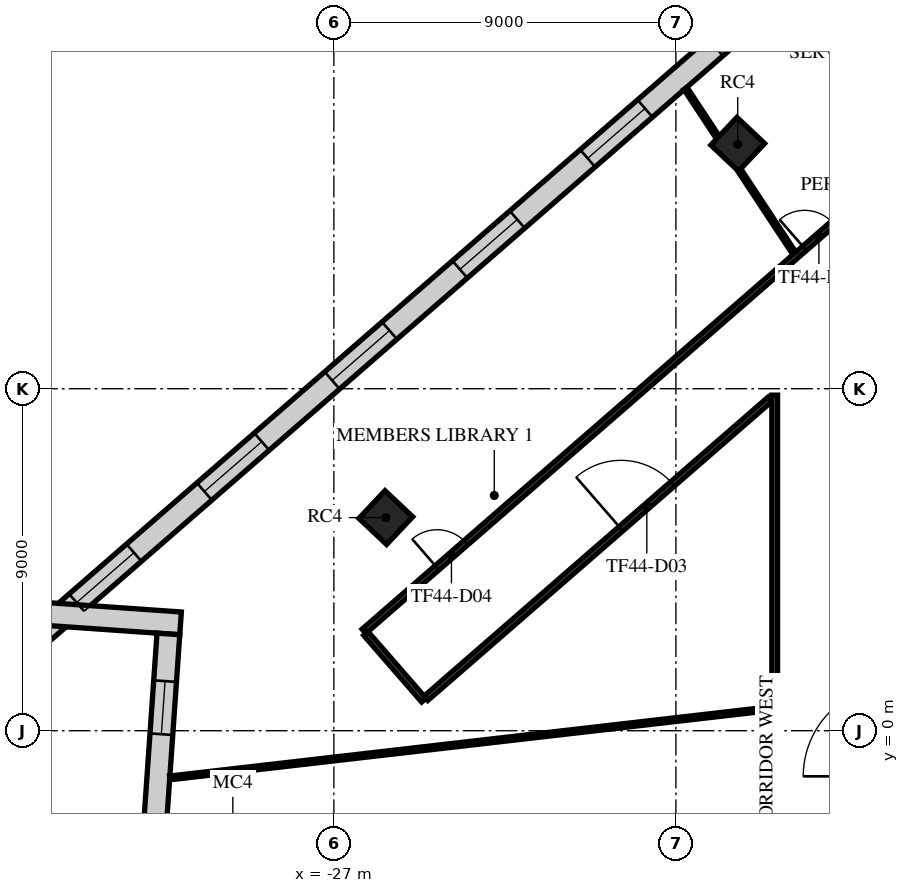
"""IFC4 building model, lengths in metres.
Left out: names, types, materials, properties, quantities, classifications, styles, units other than length and angle.
Written with IfcOpenShell. Run it as: python <this file> out.ifc"""

import sys

from ifc_helpers import new_model, si_unit, direction, frame, frame_2d, origin, origin_2d, place, context, subcontext, project, spatial, rectangle, extrude, element, fill, save


model = new_model("IFC4")
c1 = context("Model", 3, precision=1e-05, world=origin(), true_north=direction((0.0, 1.0)))
c2 = subcontext(c1, "Body", "Model", "MODEL_VIEW")
j1 = project(units=[si_unit("LENGTHUNIT", "METRE"), si_unit("PLANEANGLEUNIT", "RADIAN")], contexts=[c1])
p1 = place(None, origin())
s1 = spatial("IfcSite", under=j1, at=p1, CompositionType="ELEMENT")
p2 = place(p1, origin())
s2 = spatial("IfcBuilding", under=s1, at=p2, CompositionType="ELEMENT")
p3 = place(p2, frame((0.0, 0.0, 189.3)))
s3 = spatial("IfcBuildingStorey", under=s2, at=p3, CompositionType="ELEMENT", Elevation=189.3)
for number, where, z_axis, x_axis in (
    (1, (-16.373, 15.433, -0.38), (0.0, 0.0, 1.0), (0.686, 0.728, 0.0)),
    (2, (-25.633, 5.609, -0.38), (0.0, 0.0, 1.0), (0.686, 0.728, 0.0)),
):
    element("IfcColumn", number, at=place(p3, frame(where, z_axis=z_axis, x_axis=x_axis)), inside=s3, PredefinedType="COLUMN", context=c2, shape_type="SweptSolid", body=[
        extrude(rectangle(XDim=1.0, YDim=1.0, at=origin_2d()), origin(), (0.0, 0.0, 1.0), 4.38),
    ])
p4 = place(p3, frame((2.286, 34.715, 0.0), z_axis=(0.0, 0.0, 1.0), x_axis=(-0.754708272811, -0.656060532993, 0.0)))
e3 = element("IfcWall", 3, at=p4, inside=s3, PredefinedType="STANDARD", context=c2, shape_type="SweptSolid", body=[
    extrude(rectangle(XDim=49.0, YDim=0.6, at=frame_2d((24.5, 0.0))), origin(), (0.0, 0.0, 1.0), 3.62),
])
p5 = place(p4, frame((1.227, 0.0, 0.9)))
e4 = element("IfcOpeningElement", 4, at=p5, cuts=e3, PredefinedType="OPENING", context=c2, shape_type="SweptSolid", body=[
    extrude(rectangle(XDim=2.0, YDim=2.1, at=frame_2d((1.0, 1.05))), frame((0.0, 0.31, 0.0), z_axis=(0.0, -1.0, 0.0), x_axis=(1.0, 0.0, 0.0)), (0.0, 0.0, 1.0), 0.62),
])
p6 = place(p4, frame((5.682, 0.0, 0.9)))
e5 = element("IfcOpeningElement", 5, at=p6, cuts=e3, PredefinedType="OPENING", context=c2, shape_type="SweptSolid", body=[
    extrude(rectangle(XDim=2.0, YDim=2.1, at=frame_2d((1.0, 1.05))), frame((0.0, 0.31, 0.0), z_axis=(0.0, -1.0, 0.0), x_axis=(1.0, 0.0, 0.0)), (0.0, 0.0, 1.0), 0.62),
])
p7 = place(p4, frame((10.136, 0.0, 0.9)))
e6 = element("IfcOpeningElement", 6, at=p7, cuts=e3, PredefinedType="OPENING", context=c2, shape_type="SweptSolid", body=[
    extrude(rectangle(XDim=2.0, YDim=2.1, at=frame_2d((1.0, 1.05))), frame((0.0, 0.31, 0.0), z_axis=(0.0, -1.0, 0.0), x_axis=(1.0, 0.0, 0.0)), (0.0, 0.0, 1.0), 0.62),
])
p8 = place(p4, frame((14.591, 0.0, 0.9)))
e7 = element("IfcOpeningElement", 7, at=p8, cuts=e3, PredefinedType="OPENING", context=c2, shape_type="SweptSolid", body=[
    extrude(rectangle(XDim=2.0, YDim=2.1, at=frame_2d((1.0, 1.05))), frame((0.0, 0.31, 0.0), z_axis=(0.0, -1.0, 0.0), x_axis=(1.0, 0.0, 0.0)), (0.0, 0.0, 1.0), 0.62),
])
p9 = place(p4, frame((19.045, 0.0, 0.9)))
e8 = element("IfcOpeningElement", 8, at=p9, cuts=e3, PredefinedType="OPENING", context=c2, shape_type="SweptSolid", body=[
    extrude(rectangle(XDim=2.0, YDim=2.1, at=frame_2d((1.0, 1.05))), frame((0.0, 0.31, 0.0), z_axis=(0.0, -1.0, 0.0), x_axis=(1.0, 0.0, 0.0)), (0.0, 0.0, 1.0), 0.62),
])
p10 = place(p4, frame((23.5, 0.0, 0.9)))
e9 = element("IfcOpeningElement", 9, at=p10, cuts=e3, PredefinedType="OPENING", context=c2, shape_type="SweptSolid", body=[
    extrude(rectangle(XDim=2.0, YDim=2.1, at=frame_2d((1.0, 1.05))), frame((0.0, 0.31, 0.0), z_axis=(0.0, -1.0, 0.0), x_axis=(1.0, 0.0, 0.0)), (0.0, 0.0, 1.0), 0.62),
])
p11 = place(p4, frame((27.955, 0.0, 0.9)))
e10 = element("IfcOpeningElement", 10, at=p11, cuts=e3, PredefinedType="OPENING", context=c2, shape_type="SweptSolid", body=[
    extrude(rectangle(XDim=2.0, YDim=2.1, at=frame_2d((1.0, 1.05))), frame((0.0, 0.31, 0.0), z_axis=(0.0, -1.0, 0.0), x_axis=(1.0, 0.0, 0.0)), (0.0, 0.0, 1.0), 0.62),
])
p12 = place(p4, frame((32.409, 0.0, 0.9)))
e11 = element("IfcOpeningElement", 11, at=p12, cuts=e3, PredefinedType="OPENING", context=c2, shape_type="SweptSolid", body=[
    extrude(rectangle(XDim=2.0, YDim=2.1, at=frame_2d((1.0, 1.05))), frame((0.0, 0.31, 0.0), z_axis=(0.0, -1.0, 0.0), x_axis=(1.0, 0.0, 0.0)), (0.0, 0.0, 1.0), 0.62),
])
p13 = place(p4, frame((36.864, 0.0, 0.9)))
e12 = element("IfcOpeningElement", 12, at=p13, cuts=e3, PredefinedType="OPENING", context=c2, shape_type="SweptSolid", body=[
    extrude(rectangle(XDim=2.0, YDim=2.1, at=frame_2d((1.0, 1.05))), frame((0.0, 0.31, 0.0), z_axis=(0.0, -1.0, 0.0), x_axis=(1.0, 0.0, 0.0)), (0.0, 0.0, 1.0), 0.62),
])
p14 = place(p4, frame((41.318, 0.0, 0.9)))
e13 = element("IfcOpeningElement", 13, at=p14, cuts=e3, PredefinedType="OPENING", context=c2, shape_type="SweptSolid", body=[
    extrude(rectangle(XDim=2.0, YDim=2.1, at=frame_2d((1.0, 1.05))), frame((0.0, 0.31, 0.0), z_axis=(0.0, -1.0, 0.0), x_axis=(1.0, 0.0, 0.0)), (0.0, 0.0, 1.0), 0.62),
])
p15 = place(p4, frame((45.773, 0.0, 0.9)))
e14 = element("IfcOpeningElement", 14, at=p15, cuts=e3, PredefinedType="OPENING", context=c2, shape_type="SweptSolid", body=[
    extrude(rectangle(XDim=2.0, YDim=2.1, at=frame_2d((1.0, 1.05))), frame((0.0, 0.31, 0.0), z_axis=(0.0, -1.0, 0.0), x_axis=(1.0, 0.0, 0.0)), (0.0, 0.0, 1.0), 0.62),
])
p16 = place(p3, frame((-34.871, 3.094, 0.0), z_axis=(0.0, 0.0, 1.0), x_axis=(0.997563916762, -0.069758382828, 0.0)))
e15 = element("IfcWall", 15, at=p16, inside=s3, PredefinedType="STANDARD", context=c2, shape_type="SweptSolid", body=[
    extrude(rectangle(XDim=3.846, YDim=0.6, at=frame_2d((1.923, 0.0))), origin(), (0.0, 0.0, 1.0), 3.62),
])
p17 = place(p3, frame((-31.354, 2.547, 0.0), z_axis=(0.0, 0.0, 1.0), x_axis=(-0.069743544409, -0.997564954283, 0.0)))
e16 = element("IfcWall", 16, at=p17, inside=s3, PredefinedType="STANDARD", context=c2, shape_type="SweptSolid", body=[
    extrude(rectangle(XDim=7.778, YDim=0.6, at=frame_2d((3.889, 0.0))), origin(), (0.0, 0.0, 1.0), 3.62),
])
p18 = place(p17, frame((1.244, 0.0, 0.9)))
e17 = element("IfcOpeningElement", 17, at=p18, cuts=e16, PredefinedType="OPENING", context=c2, shape_type="SweptSolid", body=[
    extrude(rectangle(XDim=1.4, YDim=2.1, at=frame_2d((0.7, 1.05))), frame((0.0, 0.31, 0.0), z_axis=(0.0, -1.0, 0.0), x_axis=(1.0, 0.0, 0.0)), (0.0, 0.0, 1.0), 0.62),
])
p19 = place(p17, frame((5.134, 0.0, 0.9)))
e18 = element("IfcOpeningElement", 18, at=p19, cuts=e16, PredefinedType="OPENING", context=c2, shape_type="SweptSolid", body=[
    extrude(rectangle(XDim=1.4, YDim=2.1, at=frame_2d((0.7, 1.05))), frame((0.0, 0.31, 0.0), z_axis=(0.0, -1.0, 0.0), x_axis=(1.0, 0.0, 0.0)), (0.0, 0.0, 1.0), 0.62),
])
p20 = place(p3, frame((-26.208, 2.616, 0.0), z_axis=(0.0, 0.0, 1.0), x_axis=(0.754710701231, 0.656057739416, 0.0)))
e19 = element("IfcWall", 19, at=p20, inside=s3, PredefinedType="PARTITIONING", context=c2, shape_type="SweptSolid", body=[
    extrude(rectangle(XDim=36.126, YDim=0.15, at=frame_2d((18.063, 0.0))), origin(), (0.0, 0.0, 1.0), 3.17),
])
p21 = place(p20, frame((2.551, 0.0, 0.0)))
e20 = element("IfcOpeningElement", 20, at=p21, cuts=e19, PredefinedType="OPENING", context=c2, shape_type="SweptSolid", body=[
    extrude(rectangle(XDim=1.0, YDim=2.1, at=frame_2d((0.5, 1.05))), frame((0.0, 0.085, 0.0), z_axis=(0.0, -1.0, 0.0), x_axis=(1.0, 0.0, 0.0)), (0.0, 0.0, 1.0), 0.17),
])
p22 = place(p20, frame((15.362, 0.0, 0.0)))
e21 = element("IfcOpeningElement", 21, at=p22, cuts=e19, PredefinedType="OPENING", context=c2, shape_type="SweptSolid", body=[
    extrude(rectangle(XDim=1.0, YDim=2.1, at=frame_2d((0.5, 1.05))), frame((0.0, 0.085, 0.0), z_axis=(0.0, -1.0, 0.0), x_axis=(1.0, 0.0, 0.0)), (0.0, 0.0, 1.0), 0.17),
])
p23 = place(p20, frame((25.542, 0.0, 0.0)))
e22 = element("IfcOpeningElement", 22, at=p23, cuts=e19, PredefinedType="OPENING", context=c2, shape_type="SweptSolid", body=[
    extrude(rectangle(XDim=1.8, YDim=2.1, at=frame_2d((0.9, 1.05))), frame((0.0, 0.085, 0.0), z_axis=(0.0, -1.0, 0.0), x_axis=(1.0, 0.0, 0.0)), (0.0, 0.0, 1.0), 0.17),
])
p24 = place(p3, frame((-26.159, 2.559, 0.0), z_axis=(0.0, 0.0, 1.0), x_axis=(0.65619691316, -0.754589697226, 0.0)))
e23 = element("IfcWall", 23, at=p24, inside=s3, PredefinedType="PARTITIONING", context=c2, shape_type="SweptSolid", body=[
    extrude(rectangle(XDim=2.325, YDim=0.15, at=frame_2d((1.163, 0.0))), origin(), (0.0, 0.0, 1.0), 3.17),
])
p25 = place(p3, frame((-24.576, 0.854, 0.0), z_axis=(0.0, 0.0, 1.0), x_axis=(0.75472382762, 0.656042638875, 0.0)))
e24 = element("IfcWall", 24, at=p25, inside=s3, PredefinedType="PARTITIONING", context=c2, shape_type="SweptSolid", body=[
    extrude(rectangle(XDim=11.994, YDim=0.15, at=frame_2d((5.997, 0.0))), origin(), (0.0, 0.0, 1.0), 3.17),
])
p26 = place(p25, frame((6.8, 0.0, 0.0)))
e25 = element("IfcOpeningElement", 25, at=p26, cuts=e24, PredefinedType="OPENING", context=c2, shape_type="SweptSolid", body=[
    extrude(rectangle(XDim=1.8, YDim=2.1, at=frame_2d((0.9, 1.05))), frame((0.0, 0.085, 0.0), z_axis=(0.0, -1.0, 0.0), x_axis=(1.0, 0.0, 0.0)), (0.0, 0.0, 1.0), 0.17),
])
p27 = place(p3, frame((-15.4, -11.834, 0.0), z_axis=(0.0, 0.0, 1.0), x_axis=(0.0, 1.0, 0.0)))
e26 = element("IfcWall", 26, at=p27, inside=s3, PredefinedType="PARTITIONING", context=c2, shape_type="SweptSolid", body=[
    extrude(rectangle(XDim=20.666, YDim=0.15, at=frame_2d((10.333, 0.0))), origin(), (0.0, 0.0, 1.0), 3.17),
])
p28 = place(p3, frame((-31.316, -1.242, 0.0), z_axis=(0.0, 0.0, 1.0), x_axis=(0.993421473136, 0.114515399452, 0.0)))
e27 = element("IfcWall", 27, at=p28, inside=s3, PredefinedType="PARTITIONING", context=c2, shape_type="SweptSolid", body=[
    extrude(rectangle(XDim=15.941, YDim=0.1, at=frame_2d((7.97, 0.0))), origin(), (0.0, 0.0, 1.0), 3.17),
])
p29 = place(p3, frame((-17.747, 16.901, 0.0), z_axis=(0.0, 0.0, 1.0), x_axis=(0.550725721205, -0.834686276396, 0.0)))
e28 = element("IfcWall", 28, at=p29, inside=s3, PredefinedType="PARTITIONING", context=c2, shape_type="SweptSolid", body=[
    extrude(rectangle(XDim=1.548, YDim=0.1, at=frame_2d((0.774, 0.0))), origin(), (0.0, 0.0, 1.0), 3.62),
])
p30 = place(p3, frame((-16.328, 14.751, 0.0), z_axis=(0.0, 0.0, 1.0), x_axis=(0.550713616712, -0.83469426281, 0.0)))
e29 = element("IfcWall", 29, at=p30, inside=s3, PredefinedType="PARTITIONING", context=c2, shape_type="SweptSolid", body=[
    extrude(rectangle(XDim=2.619, YDim=0.1, at=frame_2d((1.309, 0.0))), origin(), (0.0, 0.0, 1.0), 3.17),
])
p31 = place(p11, origin())
e30 = element("IfcWindow", 30, at=p31, inside=s3, PartitioningType="SINGLE_PANEL", PredefinedType="WINDOW", context=c2, shape_type="SweptSolid", body=[
    extrude(rectangle(XDim=2.0, YDim=2.1, at=frame_2d((1.0, 1.05))), frame((0.0, 0.03, 0.0), z_axis=(0.0, -1.0, 0.0), x_axis=(1.0, 0.0, 0.0)), (0.0, 0.0, 1.0), 0.06),
])
fill(e10, e30)
p32 = place(p12, origin())
e31 = element("IfcWindow", 31, at=p32, inside=s3, PartitioningType="SINGLE_PANEL", PredefinedType="WINDOW", context=c2, shape_type="SweptSolid", body=[
    extrude(rectangle(XDim=2.0, YDim=2.1, at=frame_2d((1.0, 1.05))), frame((0.0, 0.03, 0.0), z_axis=(0.0, -1.0, 0.0), x_axis=(1.0, 0.0, 0.0)), (0.0, 0.0, 1.0), 0.06),
])
fill(e11, e31)
p33 = place(p13, origin())
e32 = element("IfcWindow", 32, at=p33, inside=s3, PartitioningType="SINGLE_PANEL", PredefinedType="WINDOW", context=c2, shape_type="SweptSolid", body=[
    extrude(rectangle(XDim=2.0, YDim=2.1, at=frame_2d((1.0, 1.05))), frame((0.0, 0.03, 0.0), z_axis=(0.0, -1.0, 0.0), x_axis=(1.0, 0.0, 0.0)), (0.0, 0.0, 1.0), 0.06),
])
fill(e12, e32)
p34 = place(p14, origin())
e33 = element("IfcWindow", 33, at=p34, inside=s3, PartitioningType="SINGLE_PANEL", PredefinedType="WINDOW", context=c2, shape_type="SweptSolid", body=[
    extrude(rectangle(XDim=2.0, YDim=2.1, at=frame_2d((1.0, 1.05))), frame((0.0, 0.03, 0.0), z_axis=(0.0, -1.0, 0.0), x_axis=(1.0, 0.0, 0.0)), (0.0, 0.0, 1.0), 0.06),
])
fill(e13, e33)
p35 = place(p15, origin())
e34 = element("IfcWindow", 34, at=p35, inside=s3, PartitioningType="SINGLE_PANEL", PredefinedType="WINDOW", context=c2, shape_type="SweptSolid", body=[
    extrude(rectangle(XDim=2.0, YDim=2.1, at=frame_2d((1.0, 1.05))), frame((0.0, 0.03, 0.0), z_axis=(0.0, -1.0, 0.0), x_axis=(1.0, 0.0, 0.0)), (0.0, 0.0, 1.0), 0.06),
])
fill(e14, e34)
p36 = place(p18, origin())
e35 = element("IfcWindow", 35, at=p36, inside=s3, PartitioningType="SINGLE_PANEL", PredefinedType="WINDOW", context=c2, shape_type="SweptSolid", body=[
    extrude(rectangle(XDim=1.4, YDim=2.1, at=frame_2d((0.7, 1.05))), frame((0.0, 0.03, 0.0), z_axis=(0.0, -1.0, 0.0), x_axis=(1.0, 0.0, 0.0)), (0.0, 0.0, 1.0), 0.06),
])
fill(e17, e35)
p37 = place(p26, frame((1.8, 0.0, 0.0), z_axis=(0.0, 0.0, 1.0), x_axis=(-1.0, 0.0, 0.0)))
e36 = element("IfcDoor", 36, at=p37, inside=s3, OperationType="DOUBLE_DOOR_SINGLE_SWING", PredefinedType="DOOR", context=c2, shape_type="SweptSolid", body=[
    extrude(rectangle(XDim=1.8, YDim=2.1, at=frame_2d((0.9, 1.05))), frame((0.0, 0.025, 0.0), z_axis=(0.0, -1.0, 0.0), x_axis=(1.0, 0.0, 0.0)), (0.0, 0.0, 1.0), 0.05),
])
fill(e25, e36)
p38 = place(p21, origin())
e37 = element("IfcDoor", 37, at=p38, inside=s3, OperationType="SINGLE_SWING_LEFT", PredefinedType="DOOR", context=c2, shape_type="SweptSolid", body=[
    extrude(rectangle(XDim=1.0, YDim=2.1, at=frame_2d((0.5, 1.05))), frame((0.0, 0.025, 0.0), z_axis=(0.0, -1.0, 0.0), x_axis=(1.0, 0.0, 0.0)), (0.0, 0.0, 1.0), 0.05),
])
fill(e20, e37)
p39 = place(p22, origin())
e38 = element("IfcDoor", 38, at=p39, inside=s3, OperationType="SINGLE_SWING_RIGHT", PredefinedType="DOOR", context=c2, shape_type="SweptSolid", body=[
    extrude(rectangle(XDim=1.0, YDim=2.1, at=frame_2d((0.5, 1.05))), frame((0.0, 0.025, 0.0), z_axis=(0.0, -1.0, 0.0), x_axis=(1.0, 0.0, 0.0)), (0.0, 0.0, 1.0), 0.05),
])
fill(e21, e38)
save(model, sys.argv[1])
